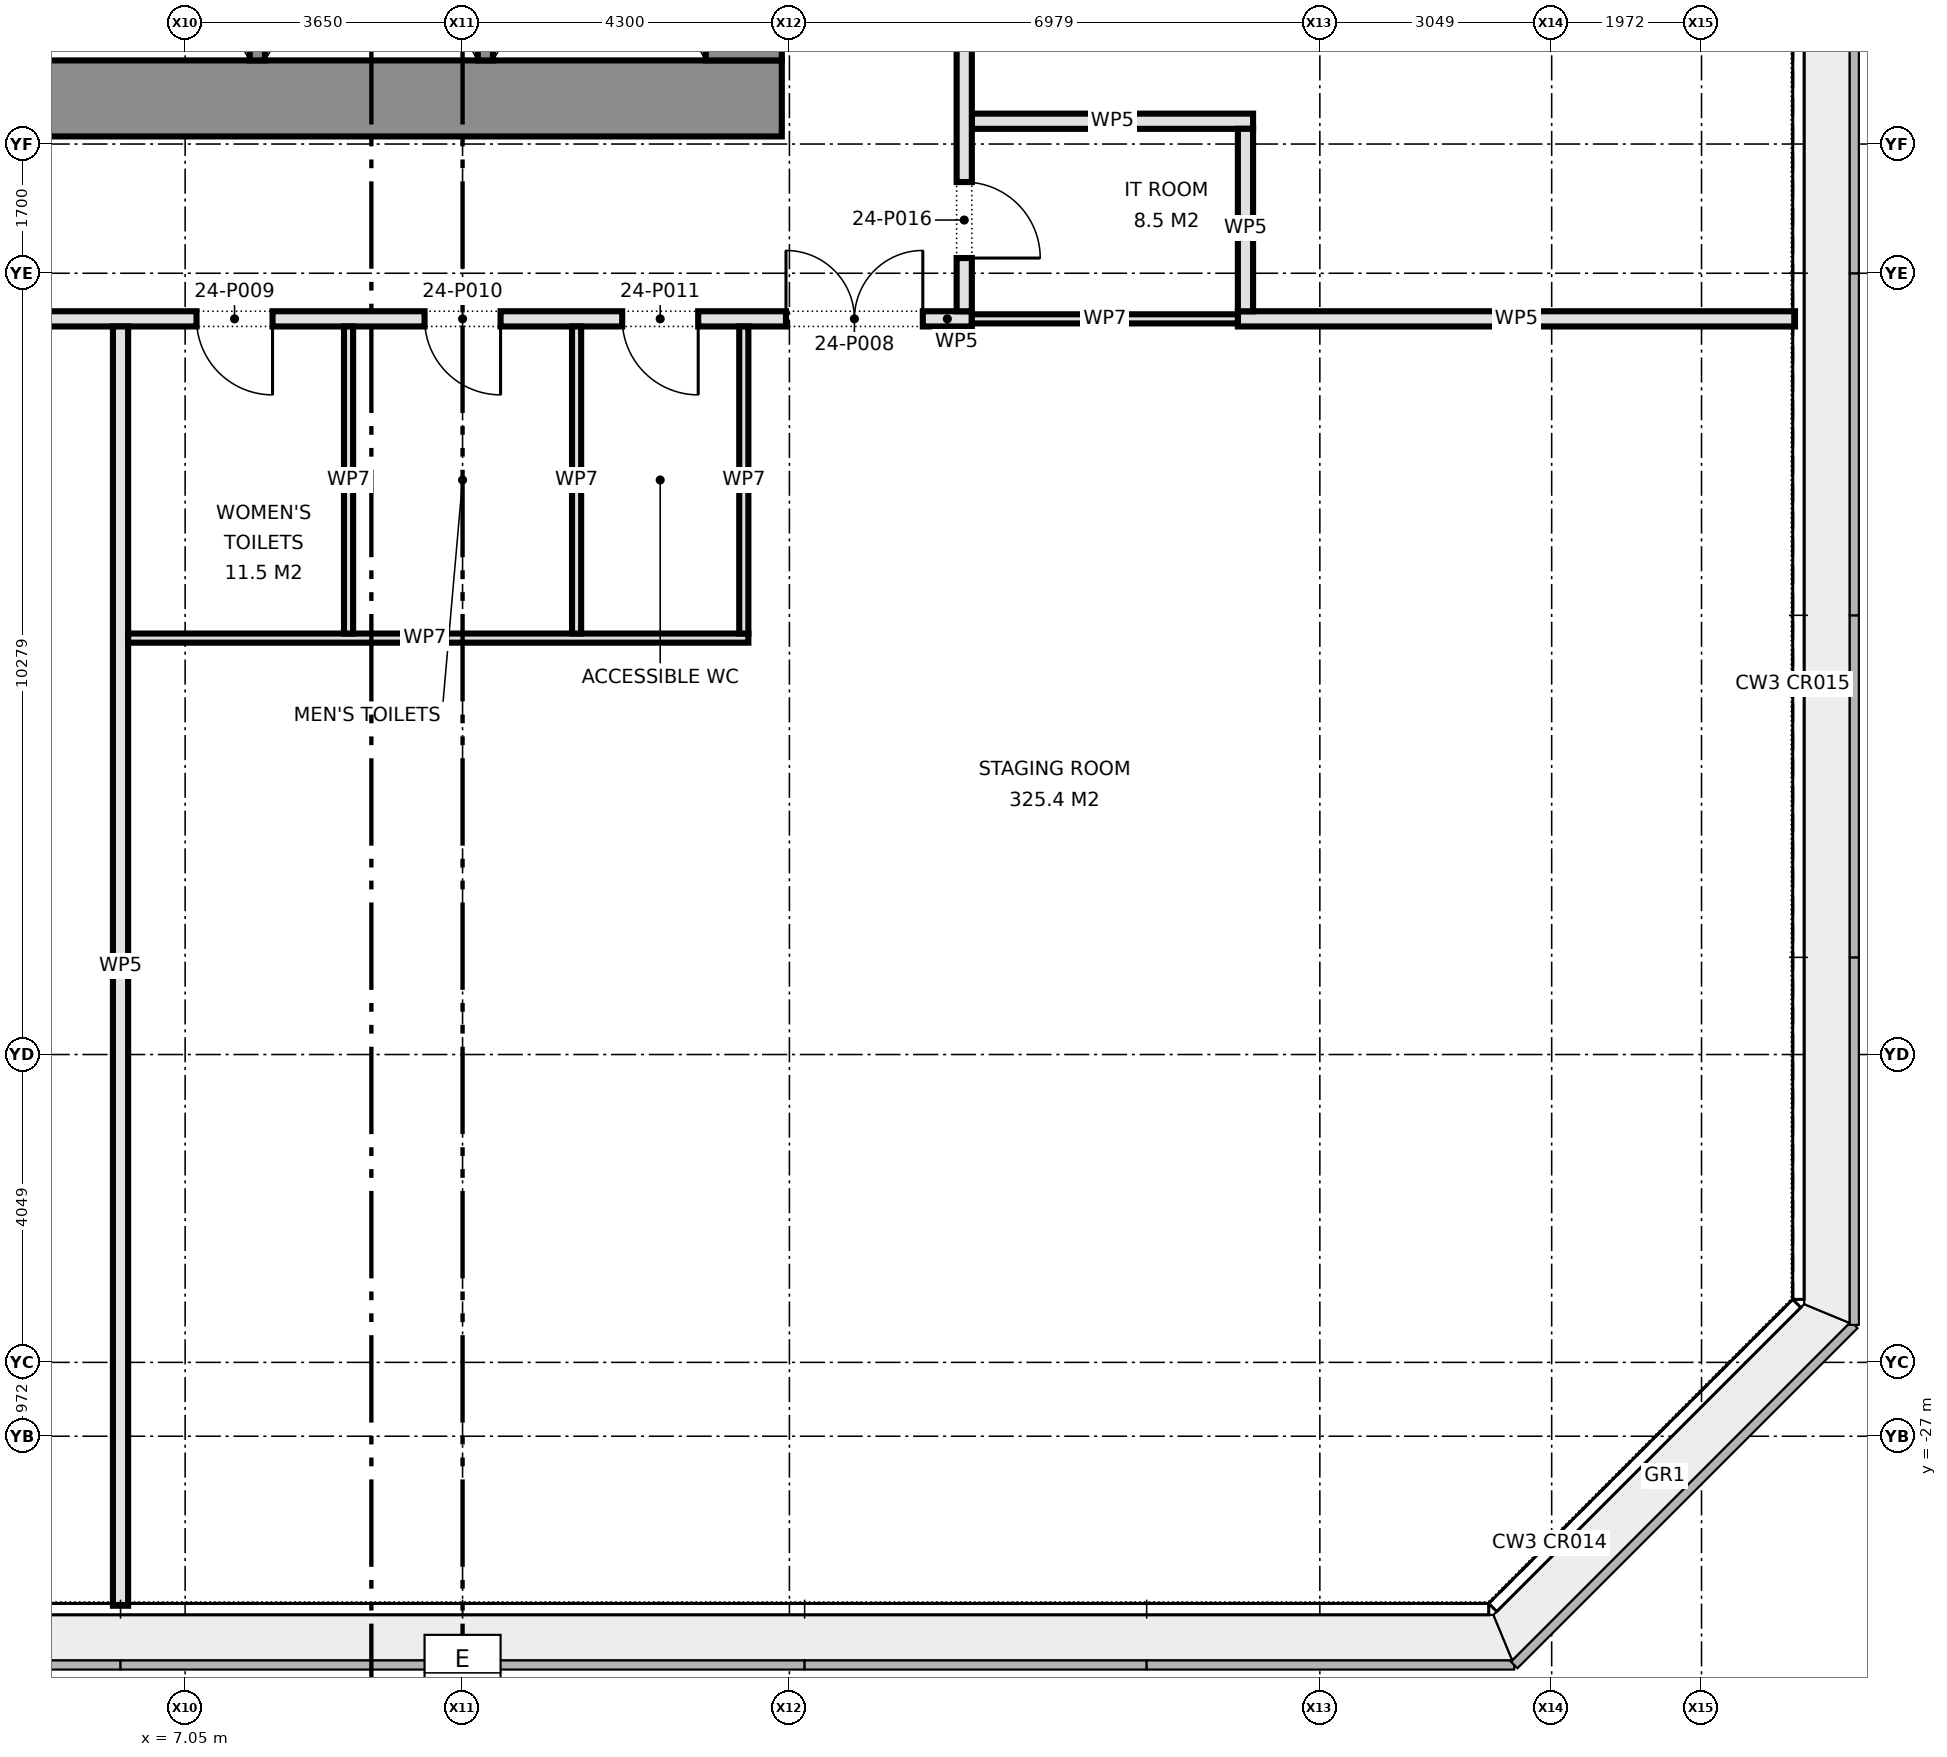
"""IFC4 building model, lengths in metres.
Left out: names, types, materials, properties, quantities, classifications, styles, units other than length and angle.
Written with IfcOpenShell. Run it as: python <this file> out.ifc"""

import sys

from ifc_helpers import new_model, si_unit, direction, frame, frame_2d, origin, place, context, subcontext, project, spatial, rectangle, extrude, element, fill, save


model = new_model("IFC4")
c1 = context("Model", 3, precision=1e-05, world=origin(), true_north=direction((0.0, 1.0)))
c2 = subcontext(c1, "Body", "Model", "MODEL_VIEW")
j1 = project(units=[si_unit("LENGTHUNIT", "METRE"), si_unit("PLANEANGLEUNIT", "RADIAN")], contexts=[c1])
p1 = place(None, origin())
s1 = spatial("IfcSite", under=j1, at=p1, CompositionType="ELEMENT")
p2 = place(p1, origin())
s2 = spatial("IfcBuilding", under=s1, at=p2, CompositionType="ELEMENT")
p3 = place(p2, frame((0.0, 0.0, 108.4)))
s3 = spatial("IfcBuildingStorey", under=s2, at=p3, CompositionType="ELEMENT", Elevation=108.4)
p4 = place(p3, frame((14.9, -9.4, 0.0), z_axis=(0.0, 0.0, 1.0), x_axis=(-1.0, 0.0, 0.0)))
e1 = element("IfcWall", 1, at=p4, inside=s3, PredefinedType="SHEAR", context=c2, shape_type="SweptSolid", body=[
    extrude(rectangle(XDim=10.8, YDim=1.0, at=frame_2d((5.4, 0.0))), origin(), (0.0, 0.0, 1.0), 4.15),
])
p5 = place(p3, frame((14.4, -3.68, 0.0), z_axis=(0.0, 0.0, 1.0), x_axis=(0.0, -1.0, 0.0)))
e2 = element("IfcWall", 2, at=p5, inside=s3, PredefinedType="SHEAR", context=c2, shape_type="SweptSolid", body=[
    extrude(rectangle(XDim=5.22, YDim=1.0, at=frame_2d((2.61, 0.0))), origin(), (0.0, 0.0, 1.0), 4.15),
])
for number, where, z_axis, x_axis in (
    (3, (11.0, -2.38, 0.0), (0.0, 0.0, 1.0), (0.0, -1.0, 0.0)),
    (4, (8.0, -2.38, 0.0), (0.0, 0.0, 1.0), (0.0, -1.0, 0.0)),
):
    element("IfcWall", number, at=place(p3, frame(where, z_axis=z_axis, x_axis=x_axis)), inside=s3, PredefinedType="SHEAR", context=c2, shape_type="SweptSolid", body=[
        extrude(rectangle(XDim=6.52, YDim=0.2, at=frame_2d((3.26, 0.0))), origin(), (0.0, 0.0, 1.0), 4.15),
    ])
p6 = place(p3, frame((-20.33, -12.3, 0.0), z_axis=(0.0, 0.0, 1.0), x_axis=(1.0, 0.0, 0.0)))
e5 = element("IfcWall", 5, at=p6, inside=s3, PredefinedType="PARTITIONING", context=c2, shape_type="SweptSolid", body=[
    extrude(rectangle(XDim=37.73, YDim=0.2, at=frame_2d((18.865, 0.0))), origin(), (0.0, 0.0, 1.0), 4.15),
])
p7 = place(p6, frame((3.69, 0.0, 0.0)))
e6 = element("IfcOpeningElement", 6, at=p7, cuts=e5, PredefinedType="OPENING", context=c2, shape_type="SweptSolid", body=[
    extrude(rectangle(XDim=1.2, YDim=2.1, at=frame_2d((0.6, 1.05))), frame((0.0, 0.11, 0.0), z_axis=(0.0, -1.0, 0.0), x_axis=(1.0, 0.0, 0.0)), (0.0, 0.0, 1.0), 0.22),
])
p8 = place(p6, frame((12.13, 0.0, 0.0)))
e7 = element("IfcOpeningElement", 7, at=p8, cuts=e5, PredefinedType="OPENING", context=c2, shape_type="SweptSolid", body=[
    extrude(rectangle(XDim=1.8, YDim=2.1, at=frame_2d((0.9, 1.05))), frame((0.0, 0.11, 0.0), z_axis=(0.0, -1.0, 0.0), x_axis=(1.0, 0.0, 0.0)), (0.0, 0.0, 1.0), 0.22),
])
p9 = place(p6, frame((21.43, 0.0, 0.0)))
e8 = element("IfcOpeningElement", 8, at=p9, cuts=e5, PredefinedType="OPENING", context=c2, shape_type="SweptSolid", body=[
    extrude(rectangle(XDim=1.2, YDim=2.1, at=frame_2d((0.6, 1.05))), frame((0.0, 0.11, 0.0), z_axis=(0.0, -1.0, 0.0), x_axis=(1.0, 0.0, 0.0)), (0.0, 0.0, 1.0), 0.22),
])
p10 = place(p6, frame((35.285, 0.0, 0.0)))
e9 = element("IfcOpeningElement", 9, at=p10, cuts=e5, PredefinedType="OPENING", context=c2, shape_type="SweptSolid", body=[
    extrude(rectangle(XDim=1.8, YDim=2.1, at=frame_2d((0.9, 1.05))), frame((0.0, 0.11, 0.0), z_axis=(0.0, -1.0, 0.0), x_axis=(1.0, 0.0, 0.0)), (0.0, 0.0, 1.0), 0.22),
])
p11 = place(p6, frame((27.53, 0.0, 0.0)))
e10 = element("IfcOpeningElement", 10, at=p11, cuts=e5, PredefinedType="OPENING", context=c2, shape_type="SweptSolid", body=[
    extrude(rectangle(XDim=1.0, YDim=2.1, at=frame_2d((0.5, 1.05))), frame((0.0, 0.11, 0.0), z_axis=(0.0, -1.0, 0.0), x_axis=(1.0, 0.0, 0.0)), (0.0, 0.0, 1.0), 0.22),
])
p12 = place(p6, frame((30.53, 0.0, 0.0)))
e11 = element("IfcOpeningElement", 11, at=p12, cuts=e5, PredefinedType="OPENING", context=c2, shape_type="SweptSolid", body=[
    extrude(rectangle(XDim=1.0, YDim=2.1, at=frame_2d((0.5, 1.05))), frame((0.0, 0.11, 0.0), z_axis=(0.0, -1.0, 0.0), x_axis=(1.0, 0.0, 0.0)), (0.0, 0.0, 1.0), 0.22),
])
p13 = place(p6, frame((33.13, 0.0, 0.0)))
e12 = element("IfcOpeningElement", 12, at=p13, cuts=e5, PredefinedType="OPENING", context=c2, shape_type="SweptSolid", body=[
    extrude(rectangle(XDim=1.0, YDim=2.1, at=frame_2d((0.5, 1.05))), frame((0.0, 0.11, 0.0), z_axis=(0.0, -1.0, 0.0), x_axis=(1.0, 0.0, 0.0)), (0.0, 0.0, 1.0), 0.22),
])
p14 = place(p3, frame((20.9, -12.3, 0.0), z_axis=(0.0, 0.0, 1.0), x_axis=(1.0, 0.0, 0.0)))
e13 = element("IfcWall", 13, at=p14, inside=s3, PredefinedType="PARTITIONING", context=c2, shape_type="SweptSolid", body=[
    extrude(rectangle(XDim=7.33, YDim=0.2, at=frame_2d((3.665, 0.0))), origin(), (0.0, 0.0, 1.0), 4.15),
])
p15 = place(p3, frame((17.4, -9.7, 0.0), z_axis=(0.0, 0.0, 1.0), x_axis=(1.0, 0.0, 0.0)))
e14 = element("IfcWall", 14, at=p15, inside=s3, PredefinedType="PARTITIONING", context=c2, shape_type="SweptSolid", body=[
    extrude(rectangle(XDim=3.7, YDim=0.2, at=frame_2d((1.85, 0.0))), origin(), (0.0, 0.0, 1.0), 4.15),
])
p16 = place(p3, frame((21.0, -12.2, 0.0), z_axis=(0.0, 0.0, 1.0), x_axis=(0.0, 1.0, 0.0)))
e15 = element("IfcWall", 15, at=p16, inside=s3, PredefinedType="PARTITIONING", context=c2, shape_type="SweptSolid", body=[
    extrude(rectangle(XDim=2.4, YDim=0.2, at=frame_2d((1.2, 0.0))), origin(), (0.0, 0.0, 1.0), 4.15),
])
p17 = place(p3, frame((17.3, -12.2, 0.0), z_axis=(0.0, 0.0, 1.0), x_axis=(0.0, 1.0, 0.0)))
e16 = element("IfcWall", 16, at=p17, inside=s3, PredefinedType="PARTITIONING", context=c2, shape_type="SweptSolid", body=[
    extrude(rectangle(XDim=24.4, YDim=0.2, at=frame_2d((12.2, 0.0))), origin(), (0.0, 0.0, 1.0), 4.15),
])
p18 = place(p17, frame((11.85, 0.0, 0.0)))
e17 = element("IfcOpeningElement", 17, at=p18, cuts=e16, PredefinedType="OPENING", context=c2, shape_type="SweptSolid", body=[
    extrude(rectangle(XDim=1.8, YDim=2.1, at=frame_2d((0.9, 1.05))), frame((0.0, 0.11, 0.0), z_axis=(0.0, -1.0, 0.0), x_axis=(1.0, 0.0, 0.0)), (0.0, 0.0, 1.0), 0.22),
])
p19 = place(p17, frame((0.7, 0.0, 0.0)))
e18 = element("IfcOpeningElement", 18, at=p19, cuts=e16, PredefinedType="OPENING", context=c2, shape_type="SweptSolid", body=[
    extrude(rectangle(XDim=1.0, YDim=2.1, at=frame_2d((0.5, 1.05))), frame((0.0, 0.11, 0.0), z_axis=(0.0, -1.0, 0.0), x_axis=(1.0, 0.0, 0.0)), (0.0, 0.0, 1.0), 0.22),
])
p20 = place(p3, frame((6.2, -29.23, 0.0), z_axis=(0.0, 0.0, 1.0), x_axis=(0.0, 1.0, 0.0)))
e19 = element("IfcWall", 19, at=p20, inside=s3, PredefinedType="PARTITIONING", context=c2, shape_type="SweptSolid", body=[
    extrude(rectangle(XDim=16.83, YDim=0.2, at=frame_2d((8.415, 0.0))), origin(), (0.0, 0.0, 1.0), 4.15),
])
p21 = place(p3, frame((6.3, -16.5, 0.0), z_axis=(0.0, 0.0, 1.0), x_axis=(1.0, 0.0, 0.0)))
e20 = element("IfcWall", 20, at=p21, inside=s3, PredefinedType="PARTITIONING", context=c2, shape_type="SweptSolid", body=[
    extrude(rectangle(XDim=8.16, YDim=0.12, at=frame_2d((4.08, 0.0))), origin(), (0.0, 0.0, 1.0), 4.15),
])
p22 = place(p3, frame((17.4, -12.3, 0.0), z_axis=(0.0, 0.0, 1.0), x_axis=(1.0, 0.0, 0.0)))
e21 = element("IfcWall", 21, at=p22, inside=s3, PredefinedType="PARTITIONING", context=c2, shape_type="SweptSolid", body=[
    extrude(rectangle(XDim=3.5, YDim=0.12, at=frame_2d((1.75, 0.0))), origin(), (0.0, 0.0, 1.0), 4.15),
])
for number, where, z_axis, x_axis in (
    (22, (14.4, -16.44, 0.0), (0.0, 0.0, 1.0), (0.0, 1.0, 0.0)),
    (23, (12.2, -16.44, 0.0), (0.0, 0.0, 1.0), (0.0, 1.0, 0.0)),
    (24, (9.2, -16.44, 0.0), (0.0, 0.0, 1.0), (0.0, 1.0, 0.0)),
):
    element("IfcWall", number, at=place(p3, frame(where, z_axis=z_axis, x_axis=x_axis)), inside=s3, PredefinedType="PARTITIONING", context=c2, shape_type="SweptSolid", body=[
        extrude(rectangle(XDim=4.04, YDim=0.12, at=frame_2d((2.02, 0.0))), origin(), (0.0, 0.0, 1.0), 4.15),
    ])
p23 = place(p10, origin())
e25 = element("IfcDoor", 25, at=p23, inside=s3, OperationType="DOUBLE_DOOR_SINGLE_SWING", PredefinedType="DOOR", context=c2, shape_type="SweptSolid", body=[
    extrude(rectangle(XDim=1.8, YDim=2.1, at=frame_2d((0.9, 1.05))), frame((0.0, 0.025, 0.0), z_axis=(0.0, -1.0, 0.0), x_axis=(1.0, 0.0, 0.0)), (0.0, 0.0, 1.0), 0.05),
])
fill(e9, e25)
p24 = place(p11, frame((1.0, 0.0, 0.0), z_axis=(0.0, 0.0, 1.0), x_axis=(-1.0, 0.0, 0.0)))
e26 = element("IfcDoor", 26, at=p24, inside=s3, OperationType="SINGLE_SWING_LEFT", PredefinedType="DOOR", context=c2, shape_type="SweptSolid", body=[
    extrude(rectangle(XDim=1.0, YDim=2.1, at=frame_2d((0.5, 1.05))), frame((0.0, 0.025, 0.0), z_axis=(0.0, -1.0, 0.0), x_axis=(1.0, 0.0, 0.0)), (0.0, 0.0, 1.0), 0.05),
])
fill(e10, e26)
p25 = place(p12, frame((1.0, 0.0, 0.0), z_axis=(0.0, 0.0, 1.0), x_axis=(-1.0, 0.0, 0.0)))
e27 = element("IfcDoor", 27, at=p25, inside=s3, OperationType="SINGLE_SWING_LEFT", PredefinedType="DOOR", context=c2, shape_type="SweptSolid", body=[
    extrude(rectangle(XDim=1.0, YDim=2.1, at=frame_2d((0.5, 1.05))), frame((0.0, 0.025, 0.0), z_axis=(0.0, -1.0, 0.0), x_axis=(1.0, 0.0, 0.0)), (0.0, 0.0, 1.0), 0.05),
])
fill(e11, e27)
p26 = place(p13, frame((1.0, 0.0, 0.0), z_axis=(0.0, 0.0, 1.0), x_axis=(-1.0, 0.0, 0.0)))
e28 = element("IfcDoor", 28, at=p26, inside=s3, OperationType="SINGLE_SWING_LEFT", PredefinedType="DOOR", context=c2, shape_type="SweptSolid", body=[
    extrude(rectangle(XDim=1.0, YDim=2.1, at=frame_2d((0.5, 1.05))), frame((0.0, 0.025, 0.0), z_axis=(0.0, -1.0, 0.0), x_axis=(1.0, 0.0, 0.0)), (0.0, 0.0, 1.0), 0.05),
])
fill(e12, e28)
p27 = place(p19, frame((1.0, 0.0, 0.0), z_axis=(0.0, 0.0, 1.0), x_axis=(-1.0, 0.0, 0.0)))
e29 = element("IfcDoor", 29, at=p27, inside=s3, OperationType="SINGLE_SWING_RIGHT", PredefinedType="DOOR", context=c2, shape_type="SweptSolid", body=[
    extrude(rectangle(XDim=1.0, YDim=2.1, at=frame_2d((0.5, 1.05))), frame((0.0, 0.025, 0.0), z_axis=(0.0, -1.0, 0.0), x_axis=(1.0, 0.0, 0.0)), (0.0, 0.0, 1.0), 0.05),
])
fill(e18, e29)
save(model, sys.argv[1])
